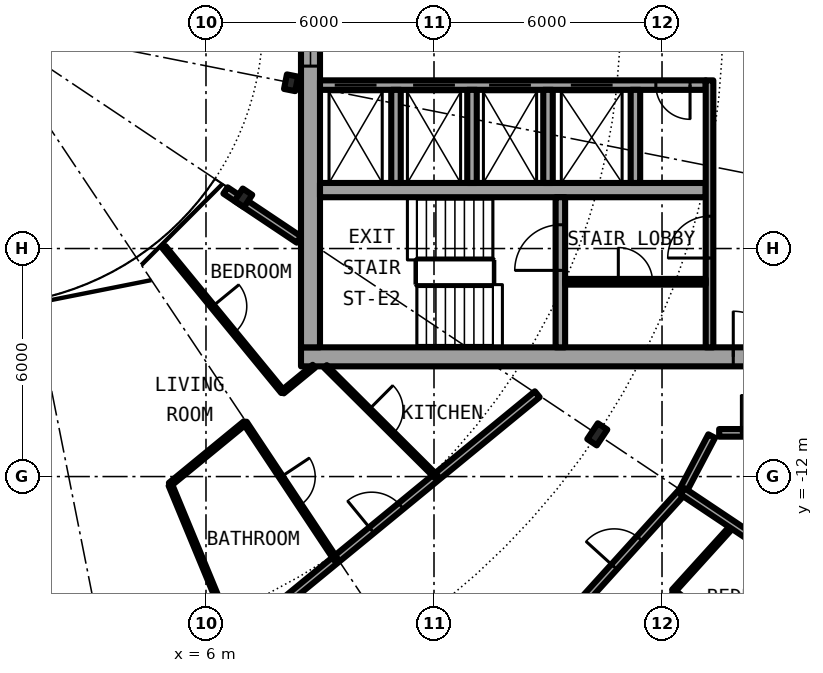
"""IFC4 building model, lengths in metres.
Left out: names, types, materials, properties, quantities, classifications, styles, units other than length and angle.
Written with IfcOpenShell. Run it as: python <this file> out.ifc"""

import sys

from ifc_helpers import new_model, si_unit, direction, frame, frame_2d, origin, origin_2d, place, context, subcontext, project, spatial, rectangle, i_section, extrude, element, fill, save


model = new_model("IFC4")
c1 = context("Model", 3, precision=1e-05, world=origin(), true_north=direction((0.0, 1.0)))
c2 = subcontext(c1, "Body", "Model", "MODEL_VIEW")
j1 = project(units=[si_unit("LENGTHUNIT", "METRE"), si_unit("PLANEANGLEUNIT", "RADIAN")], contexts=[c1])
p1 = place(None, origin())
s1 = spatial("IfcSite", under=j1, at=p1, CompositionType="ELEMENT")
p2 = place(p1, origin())
s2 = spatial("IfcBuilding", under=s1, at=p2, CompositionType="ELEMENT")
p3 = place(p2, frame((0.0, 0.0, 145.2)))
s3 = spatial("IfcBuildingStorey", under=s2, at=p3, CompositionType="ELEMENT", Elevation=145.2)
p4 = place(p3, frame((16.297, -10.889, 0.0), z_axis=(0.0, 0.0, 1.0), x_axis=(0.831469612303, -0.55557023302, 0.0)))
e1 = element("IfcColumn", 1, at=p4, inside=s3, PredefinedType="COLUMN", context=c2, shape_type="SweptSolid", body=[
    extrude(i_section(OverallWidth=0.3, OverallDepth=0.5, WebThickness=0.014, FlangeThickness=0.028, FilletRadius=0.027, at=origin_2d()), origin(), (0.0, 0.0, 1.0), 3.05),
])
for number, where, z_axis, x_axis in (
    (2, (6.984, -4.667, 0.0), (0.0, 0.0, 1.0), (0.831, -0.556, 0.0)),
    (3, (8.239, -1.639, 0.0), (0.0, 0.0, 1.0), (0.981, -0.195, 0.0)),
):
    element("IfcColumn", number, at=place(p3, frame(where, z_axis=z_axis, x_axis=x_axis)), inside=s3, PredefinedType="COLUMN", context=c2, shape_type="SweptSolid", body=[
        extrude(i_section(OverallWidth=0.3, OverallDepth=0.39, WebThickness=0.011, FlangeThickness=0.019, FilletRadius=0.027, at=origin_2d()), origin(), (0.0, 0.0, 1.0), 3.05),
    ])
p5 = place(p3, frame((8.5, -8.85, 0.0), z_axis=(0.0, 0.0, 1.0), x_axis=(1.0, 0.0, 0.0)))
e4 = element("IfcWall", 4, at=p5, inside=s3, PredefinedType="SHEAR", context=c2, shape_type="SweptSolid", body=[
    extrude(rectangle(XDim=13.6, YDim=0.5, at=frame_2d((6.8, 0.0))), origin(), (0.0, 0.0, 1.0), 3.05),
])
p6 = place(p5, frame((11.375, 0.0, 0.0)))
e5 = element("IfcOpeningElement", 5, at=p6, cuts=e4, PredefinedType="OPENING", context=c2, shape_type="SweptSolid", body=[
    extrude(rectangle(XDim=1.2, YDim=2.3, at=frame_2d((0.6, 1.15))), frame((0.0, 0.26, 0.0), z_axis=(0.0, -1.0, 0.0), x_axis=(1.0, 0.0, 0.0)), (0.0, 0.0, 1.0), 0.52),
])
p7 = place(p3, frame((8.75, -8.6, 0.0), z_axis=(0.0, 0.0, 1.0), x_axis=(0.0, 1.0, 0.0)))
e6 = element("IfcWall", 6, at=p7, inside=s3, PredefinedType="SHEAR", context=c2, shape_type="SweptSolid", body=[
    extrude(rectangle(XDim=17.2, YDim=0.5, at=frame_2d((8.6, 0.0))), origin(), (0.0, 0.0, 1.0), 3.05),
])
p8 = place(p7, frame((7.4, 0.0, 0.1)))
e7 = element("IfcOpeningElement", 7, at=p8, cuts=e6, PredefinedType="OPENING", context=c2, shape_type="SweptSolid", body=[
    extrude(rectangle(XDim=2.4, YDim=2.2, at=frame_2d((1.2, 1.1))), frame((0.0, 0.26, 0.0), z_axis=(0.0, -1.0, 0.0), x_axis=(1.0, 0.0, 0.0)), (0.0, 0.0, 1.0), 0.52),
])
p9 = place(p3, frame((19.15, -1.7, 0.0), z_axis=(0.0, 0.0, 1.0), x_axis=(-1.0, 0.0, 0.0)))
e8 = element("IfcWall", 8, at=p9, inside=s3, PredefinedType="SHEAR", context=c2, shape_type="SweptSolid", body=[
    extrude(rectangle(XDim=10.15, YDim=0.25, at=frame_2d((5.075, 0.0))), origin(), (0.0, 0.0, 1.0), 3.05),
])
p10 = place(p9, frame((8.663, 0.0, 0.0)))
e9 = element("IfcOpeningElement", 9, at=p10, cuts=e8, PredefinedType="OPENING", context=c2, shape_type="SweptSolid", body=[
    extrude(rectangle(XDim=1.1, YDim=2.3, at=frame_2d((0.55, 1.15))), frame((0.0, 0.135, 0.0), z_axis=(0.0, -1.0, 0.0), x_axis=(1.0, 0.0, 0.0)), (0.0, 0.0, 1.0), 0.27),
])
p11 = place(p9, frame((6.6, 0.0, 0.0)))
e10 = element("IfcOpeningElement", 10, at=p11, cuts=e8, PredefinedType="OPENING", context=c2, shape_type="SweptSolid", body=[
    extrude(rectangle(XDim=1.1, YDim=2.3, at=frame_2d((0.55, 1.15))), frame((0.0, 0.135, 0.0), z_axis=(0.0, -1.0, 0.0), x_axis=(1.0, 0.0, 0.0)), (0.0, 0.0, 1.0), 0.27),
])
p12 = place(p9, frame((4.6, 0.0, 0.0)))
e11 = element("IfcOpeningElement", 11, at=p12, cuts=e8, PredefinedType="OPENING", context=c2, shape_type="SweptSolid", body=[
    extrude(rectangle(XDim=1.1, YDim=2.3, at=frame_2d((0.55, 1.15))), frame((0.0, 0.135, 0.0), z_axis=(0.0, -1.0, 0.0), x_axis=(1.0, 0.0, 0.0)), (0.0, 0.0, 1.0), 0.27),
])
p13 = place(p9, frame((2.45, 0.0, 0.0)))
e12 = element("IfcOpeningElement", 12, at=p13, cuts=e8, PredefinedType="OPENING", context=c2, shape_type="SweptSolid", body=[
    extrude(rectangle(XDim=1.1, YDim=2.3, at=frame_2d((0.55, 1.15))), frame((0.0, 0.135, 0.0), z_axis=(0.0, -1.0, 0.0), x_axis=(1.0, 0.0, 0.0)), (0.0, 0.0, 1.0), 0.27),
])
p14 = place(p9, frame((0.413, 0.0, 0.0)))
e13 = element("IfcOpeningElement", 13, at=p14, cuts=e8, PredefinedType="OPENING", context=c2, shape_type="SweptSolid", body=[
    extrude(rectangle(XDim=0.9, YDim=2.3, at=frame_2d((0.45, 1.15))), frame((0.0, 0.135, 0.0), z_axis=(0.0, -1.0, 0.0), x_axis=(1.0, 0.0, 0.0)), (0.0, 0.0, 1.0), 0.27),
])
p15 = place(p3, frame((9.0, -4.462, 0.0), z_axis=(0.0, 0.0, 1.0), x_axis=(1.0, 0.0, 0.0)))
e14 = element("IfcWall", 14, at=p15, inside=s3, PredefinedType="SHEAR", context=c2, shape_type="SweptSolid", body=[
    extrude(rectangle(XDim=10.15, YDim=0.375, at=frame_2d((5.075, 0.0))), origin(), (0.0, 0.0, 1.0), 3.05),
])
p16 = place(p3, frame((15.325, -8.6, 0.0), z_axis=(0.0, 0.0, 1.0), x_axis=(0.0, 1.0, 0.0)))
e15 = element("IfcWall", 15, at=p16, inside=s3, PredefinedType="SHEAR", context=c2, shape_type="SweptSolid", body=[
    extrude(rectangle(XDim=3.95, YDim=0.25, at=frame_2d((1.975, 0.0))), origin(), (0.0, 0.0, 1.0), 3.05),
])
p17 = place(p16, frame((2.025, 0.0, 0.0)))
e16 = element("IfcOpeningElement", 16, at=p17, cuts=e15, PredefinedType="OPENING", context=c2, shape_type="SweptSolid", body=[
    extrude(rectangle(XDim=1.2, YDim=2.3, at=frame_2d((0.6, 1.15))), frame((0.0, 0.135, 0.0), z_axis=(0.0, -1.0, 0.0), x_axis=(1.0, 0.0, 0.0)), (0.0, 0.0, 1.0), 0.27),
])
for number, where, z_axis, x_axis in (
    (17, (15.0, -1.825, 0.0), (0.0, 0.0, 1.0), (0.0, -1.0, 0.0)),
    (18, (17.3, -1.825, 0.0), (0.0, 0.0, 1.0), (0.0, -1.0, 0.0)),
):
    element("IfcWall", number, at=place(p3, frame(where, z_axis=z_axis, x_axis=x_axis)), inside=s3, PredefinedType="SOLIDWALL", context=c2, shape_type="SweptSolid", body=[
        extrude(rectangle(XDim=2.45, YDim=0.25, at=frame_2d((1.225, 0.0))), origin(), (0.0, 0.0, 1.0), 2.7),
    ])
p18 = place(p3, frame((19.25, -8.6, 0.0), z_axis=(0.0, 0.0, 1.0), x_axis=(0.0, 1.0, 0.0)))
e19 = element("IfcWall", 19, at=p18, inside=s3, PredefinedType="SOLIDWALL", context=c2, shape_type="SweptSolid", body=[
    extrude(rectangle(XDim=7.025, YDim=0.2, at=frame_2d((3.513, 0.0))), origin(), (0.0, 0.0, 1.0), 2.7),
])
p19 = place(p18, frame((2.35, 0.0, 0.0)))
e20 = element("IfcOpeningElement", 20, at=p19, cuts=e19, PredefinedType="OPENING", context=c2, shape_type="SweptSolid", body=[
    extrude(rectangle(XDim=1.1, YDim=2.3, at=frame_2d((0.55, 1.15))), frame((0.0, 0.11, 0.0), z_axis=(0.0, -1.0, 0.0), x_axis=(1.0, 0.0, 0.0)), (0.0, 0.0, 1.0), 0.22),
])
for number, where, z_axis, x_axis in (
    (21, (11.0, -1.825, 0.0), (0.0, 0.0, 1.0), (0.0, -1.0, 0.0)),
    (22, (13.0, -1.825, 0.0), (0.0, 0.0, 1.0), (0.0, -1.0, 0.0)),
):
    element("IfcWall", number, at=place(p3, frame(where, z_axis=z_axis, x_axis=x_axis)), inside=s3, PredefinedType="SOLIDWALL", context=c2, shape_type="SweptSolid", body=[
        extrude(rectangle(XDim=2.45, YDim=0.25, at=frame_2d((1.225, 0.0))), origin(), (0.0, 0.0, 1.0), 2.7),
    ])
p20 = place(p3, frame((15.45, -6.875, 0.0), z_axis=(0.0, 0.0, 1.0), x_axis=(1.0, 0.0, 0.0)))
e23 = element("IfcWall", 23, at=p20, inside=s3, PredefinedType="PARTITIONING", context=c2, shape_type="SweptSolid", body=[
    extrude(rectangle(XDim=3.7, YDim=0.15, at=frame_2d((1.85, 0.0))), origin(), (0.0, 0.0, 1.0), 2.7),
])
p21 = place(p20, frame((1.4, 0.0, 0.0)))
e24 = element("IfcOpeningElement", 24, at=p21, cuts=e23, PredefinedType="OPENING", context=c2, shape_type="SweptSolid", body=[
    extrude(rectangle(XDim=0.9, YDim=2.3, at=frame_2d((0.45, 1.15))), frame((0.0, 0.085, 0.0), z_axis=(0.0, -1.0, 0.0), x_axis=(1.0, 0.0, 0.0)), (0.0, 0.0, 1.0), 0.17),
])
p22 = place(p3, frame((18.302, -15.01, 0.0), z_axis=(0.0, 0.0, 1.0), x_axis=(0.671637685376, 0.740879760544, 0.0)))
e25 = element("IfcWall", 25, at=p22, inside=s3, PredefinedType="PARTITIONING", context=c2, shape_type="SweptSolid", body=[
    extrude(rectangle(XDim=2.338, YDim=0.1, at=frame_2d((1.169, 0.0))), origin(), (0.0, 0.0, 1.0), 2.7),
])
p23 = place(p3, frame((18.542, -12.389, 0.0), z_axis=(0.0, 0.0, 1.0), x_axis=(0.465605550524, 0.884992356646, 0.0)))
e26 = element("IfcWall", 26, at=p23, inside=s3, PredefinedType="PARTITIONING", context=c2, shape_type="SweptSolid", body=[
    extrude(rectangle(XDim=1.643, YDim=0.2, at=frame_2d((0.821, 0.0))), origin(), (0.0, 0.0, 1.0), 2.7),
])
p24 = place(p3, frame((14.147, -17.238, 0.0), z_axis=(0.0, 0.0, 1.0), x_axis=(0.671561669125, 0.740948665268, 0.0)))
e27 = element("IfcWall", 27, at=p24, inside=s3, PredefinedType="PARTITIONING", context=c2, shape_type="SweptSolid", body=[
    extrude(rectangle(XDim=6.544, YDim=0.2, at=frame_2d((3.272, 0.0))), origin(), (0.0, 0.0, 1.0), 2.7),
])
p25 = place(p24, frame((3.862, 0.0, 0.0)))
e28 = element("IfcOpeningElement", 28, at=p25, cuts=e27, PredefinedType="OPENING", context=c2, shape_type="SweptSolid", body=[
    extrude(rectangle(XDim=1.0, YDim=2.3, at=frame_2d((0.5, 1.15))), frame((0.0, 0.11, 0.0), z_axis=(0.0, -1.0, 0.0), x_axis=(1.0, 0.0, 0.0)), (0.0, 0.0, 1.0), 0.22),
])
p26 = place(p3, frame((6.773, -16.353, 0.0), z_axis=(0.0, 0.0, 1.0), x_axis=(0.773034536097, 0.634363938131, 0.0)))
e29 = element("IfcWall", 29, at=p26, inside=s3, PredefinedType="PARTITIONING", context=c2, shape_type="SweptSolid", body=[
    extrude(rectangle(XDim=10.277, YDim=0.2, at=frame_2d((5.138, 0.0))), origin(), (0.0, 0.0, 1.0), 2.7),
])
p27 = place(p26, frame((4.638, 0.0, 0.0)))
e30 = element("IfcOpeningElement", 30, at=p27, cuts=e29, PredefinedType="OPENING", context=c2, shape_type="SweptSolid", body=[
    extrude(rectangle(XDim=1.0, YDim=2.3, at=frame_2d((0.5, 1.15))), frame((0.0, 0.11, 0.0), z_axis=(0.0, -1.0, 0.0), x_axis=(1.0, 0.0, 0.0)), (0.0, 0.0, 1.0), 0.22),
])
p28 = place(p3, frame((5.055, -12.204, 0.0), z_axis=(0.0, 0.0, 1.0), x_axis=(0.772943675046, 0.634474645046, 0.0)))
e31 = element("IfcWall", 31, at=p28, inside=s3, PredefinedType="PARTITIONING", context=c2, shape_type="SweptSolid", body=[
    extrude(rectangle(XDim=2.557, YDim=0.1, at=frame_2d((1.278, 0.0))), origin(), (0.0, 0.0, 1.0), 2.7),
])
p29 = place(p3, frame((8.016, -9.773, 0.0), z_axis=(0.0, 0.0, 1.0), x_axis=(0.7731800648, 0.634186555673, 0.0)))
e32 = element("IfcWall", 32, at=p29, inside=s3, PredefinedType="PARTITIONING", context=c2, shape_type="SweptSolid", body=[
    extrude(rectangle(XDim=1.064, YDim=0.1, at=frame_2d((0.532, 0.0))), origin(), (0.0, 0.0, 1.0), 2.7),
])
p30 = place(p3, frame((19.504, -10.85, 0.0), z_axis=(0.0, 0.0, 1.0), x_axis=(1.0, 0.0, 0.0)))
e33 = element("IfcWall", 33, at=p30, inside=s3, PredefinedType="PARTITIONING", context=c2, shape_type="SweptSolid", body=[
    extrude(rectangle(XDim=2.171, YDim=0.2, at=frame_2d((1.085, 0.0))), origin(), (0.0, 0.0, 1.0), 2.7),
])
p31 = place(p30, frame((0.585, 0.0, 0.0)))
e34 = element("IfcOpeningElement", 34, at=p31, cuts=e33, PredefinedType="OPENING", context=c2, shape_type="SweptSolid", body=[
    extrude(rectangle(XDim=1.0, YDim=2.3, at=frame_2d((0.5, 1.15))), frame((0.0, 0.11, 0.0), z_axis=(0.0, -1.0, 0.0), x_axis=(1.0, 0.0, 0.0)), (0.0, 0.0, 1.0), 0.22),
])
p32 = place(p3, frame((6.513, -4.472, 0.0), z_axis=(0.0, 0.0, 1.0), x_axis=(0.83133816625, -0.555766905579, 0.0)))
e35 = element("IfcWall", 35, at=p32, inside=s3, PredefinedType="PARTITIONING", context=c2, shape_type="SweptSolid", body=[
    extrude(rectangle(XDim=2.323, YDim=0.2, at=frame_2d((1.162, 0.0))), origin(), (0.0, 0.0, 1.0), 2.7),
])
p33 = place(p3, frame((4.898, -5.968, 0.0), z_axis=(0.0, 0.0, 1.0), x_axis=(0.634401778971, -0.773003481776, 0.0)))
e36 = element("IfcWall", 36, at=p33, inside=s3, PredefinedType="PARTITIONING", context=c2, shape_type="SweptSolid", body=[
    extrude(rectangle(XDim=4.92, YDim=0.1, at=frame_2d((2.46, 0.0))), origin(), (0.0, 0.0, 1.0), 2.7),
])
p34 = place(p33, frame((2.01, 0.0, 0.0)))
e37 = element("IfcOpeningElement", 37, at=p34, cuts=e36, PredefinedType="OPENING", context=c2, shape_type="SweptSolid", body=[
    extrude(rectangle(XDim=0.9, YDim=2.3, at=frame_2d((0.45, 1.15))), frame((0.0, 0.06, 0.0), z_axis=(0.0, -1.0, 0.0), x_axis=(1.0, 0.0, 0.0)), (0.0, 0.0, 1.0), 0.12),
])
p35 = place(p3, frame((7.028, -10.584, 0.0), z_axis=(0.0, 0.0, 1.0), x_axis=(0.553303732327, -0.832979579457, 0.0)))
e38 = element("IfcWall", 38, at=p35, inside=s3, PredefinedType="PARTITIONING", context=c2, shape_type="SweptSolid", body=[
    extrude(rectangle(XDim=4.319, YDim=0.1, at=frame_2d((2.16, 0.0))), origin(), (0.0, 0.0, 1.0), 2.7),
])
p36 = place(p35, frame((1.71, 0.0, 0.0)))
e39 = element("IfcOpeningElement", 39, at=p36, cuts=e38, PredefinedType="OPENING", context=c2, shape_type="SweptSolid", body=[
    extrude(rectangle(XDim=0.9, YDim=2.3, at=frame_2d((0.45, 1.15))), frame((0.0, 0.06, 0.0), z_axis=(0.0, -1.0, 0.0), x_axis=(1.0, 0.0, 0.0)), (0.0, 0.0, 1.0), 0.12),
])
p37 = place(p3, frame((9.144, -9.104, 0.0), z_axis=(0.0, 0.0, 1.0), x_axis=(0.708793214553, -0.705416316088, 0.0)))
e40 = element("IfcWall", 40, at=p37, inside=s3, PredefinedType="PARTITIONING", context=c2, shape_type="SweptSolid", body=[
    extrude(rectangle(XDim=4.121, YDim=0.1, at=frame_2d((2.061, 0.0))), origin(), (0.0, 0.0, 1.0), 2.7),
])
p38 = place(p37, frame((1.611, 0.0, 0.0)))
e41 = element("IfcOpeningElement", 41, at=p38, cuts=e40, PredefinedType="OPENING", context=c2, shape_type="SweptSolid", body=[
    extrude(rectangle(XDim=0.9, YDim=2.3, at=frame_2d((0.45, 1.15))), frame((0.0, 0.06, 0.0), z_axis=(0.0, -1.0, 0.0), x_axis=(1.0, 0.0, 0.0)), (0.0, 0.0, 1.0), 0.12),
])
p39 = place(p3, frame((18.299, -15.014, 0.0), z_axis=(0.0, 0.0, 1.0), x_axis=(0.773131168403, -0.634246163917, 0.0)))
e42 = element("IfcWall", 42, at=p39, inside=s3, PredefinedType="PARTITIONING", context=c2, shape_type="SweptSolid", body=[
    extrude(rectangle(XDim=3.505, YDim=0.1, at=frame_2d((1.752, 0.0))), origin(), (0.0, 0.0, 1.0), 2.7),
])
p40 = place(p39, frame((1.302, 0.0, 0.0)))
e43 = element("IfcOpeningElement", 43, at=p40, cuts=e42, PredefinedType="OPENING", context=c2, shape_type="SweptSolid", body=[
    extrude(rectangle(XDim=0.9, YDim=2.3, at=frame_2d((0.45, 1.15))), frame((0.0, 0.06, 0.0), z_axis=(0.0, -1.0, 0.0), x_axis=(1.0, 0.0, 0.0)), (0.0, 0.0, 1.0), 0.12),
])
p41 = place(p3, frame((18.542, -12.389, 0.0), z_axis=(0.0, 0.0, 1.0), x_axis=(0.831387096605, -0.55569370664, 0.0)))
e44 = element("IfcWall", 44, at=p41, inside=s3, PredefinedType="PARTITIONING", context=c2, shape_type="SweptSolid", body=[
    extrude(rectangle(XDim=4.875, YDim=0.2, at=frame_2d((2.438, 0.0))), origin(), (0.0, 0.0, 1.0), 2.7),
])
p42 = place(p3, frame((6.765, -16.334, 0.0), z_axis=(0.0, 0.0, 1.0), x_axis=(-0.382498794932, 0.923955990226, 0.0)))
e45 = element("IfcWall", 45, at=p42, inside=s3, PredefinedType="PARTITIONING", context=c2, shape_type="SweptSolid", body=[
    extrude(rectangle(XDim=4.449, YDim=0.1, at=frame_2d((2.225, 0.0))), origin(), (0.0, 0.0, 1.0), 2.7),
])
p43 = place(p10, origin())
e46 = element("IfcDoor", 46, at=p43, inside=s3, OperationType="DOUBLE_DOOR_SLIDING", PredefinedType="DOOR", context=c2, shape_type="SweptSolid", body=[
    extrude(rectangle(XDim=1.1, YDim=2.3, at=frame_2d((0.55, 1.15))), frame((0.0, 0.025, 0.0), z_axis=(0.0, -1.0, 0.0), x_axis=(1.0, 0.0, 0.0)), (0.0, 0.0, 1.0), 0.05),
])
fill(e9, e46)
p44 = place(p11, origin())
e47 = element("IfcDoor", 47, at=p44, inside=s3, OperationType="DOUBLE_DOOR_SLIDING", PredefinedType="DOOR", context=c2, shape_type="SweptSolid", body=[
    extrude(rectangle(XDim=1.1, YDim=2.3, at=frame_2d((0.55, 1.15))), frame((0.0, 0.025, 0.0), z_axis=(0.0, -1.0, 0.0), x_axis=(1.0, 0.0, 0.0)), (0.0, 0.0, 1.0), 0.05),
])
fill(e10, e47)
p45 = place(p12, origin())
e48 = element("IfcDoor", 48, at=p45, inside=s3, OperationType="DOUBLE_DOOR_SLIDING", PredefinedType="DOOR", context=c2, shape_type="SweptSolid", body=[
    extrude(rectangle(XDim=1.1, YDim=2.3, at=frame_2d((0.55, 1.15))), frame((0.0, 0.025, 0.0), z_axis=(0.0, -1.0, 0.0), x_axis=(1.0, 0.0, 0.0)), (0.0, 0.0, 1.0), 0.05),
])
fill(e11, e48)
p46 = place(p13, origin())
e49 = element("IfcDoor", 49, at=p46, inside=s3, OperationType="DOUBLE_DOOR_SLIDING", PredefinedType="DOOR", context=c2, shape_type="SweptSolid", body=[
    extrude(rectangle(XDim=1.1, YDim=2.3, at=frame_2d((0.55, 1.15))), frame((0.0, 0.025, 0.0), z_axis=(0.0, -1.0, 0.0), x_axis=(1.0, 0.0, 0.0)), (0.0, 0.0, 1.0), 0.05),
])
fill(e12, e49)
p47 = place(p14, origin())
e50 = element("IfcDoor", 50, at=p47, inside=s3, OperationType="SINGLE_SWING_RIGHT", PredefinedType="DOOR", context=c2, shape_type="SweptSolid", body=[
    extrude(rectangle(XDim=0.9, YDim=2.3, at=frame_2d((0.45, 1.15))), frame((0.0, 0.025, 0.0), z_axis=(0.0, -1.0, 0.0), x_axis=(1.0, 0.0, 0.0)), (0.0, 0.0, 1.0), 0.05),
])
fill(e13, e50)
p48 = place(p21, origin())
e51 = element("IfcDoor", 51, at=p48, inside=s3, OperationType="SINGLE_SWING_LEFT", PredefinedType="DOOR", context=c2, shape_type="SweptSolid", body=[
    extrude(rectangle(XDim=0.9, YDim=2.3, at=frame_2d((0.45, 1.15))), frame((0.0, 0.025, 0.0), z_axis=(0.0, -1.0, 0.0), x_axis=(1.0, 0.0, 0.0)), (0.0, 0.0, 1.0), 0.05),
])
fill(e24, e51)
p49 = place(p17, origin())
e52 = element("IfcDoor", 52, at=p49, inside=s3, OperationType="SINGLE_SWING_LEFT", PredefinedType="DOOR", context=c2, shape_type="SweptSolid", body=[
    extrude(rectangle(XDim=1.2, YDim=2.3, at=frame_2d((0.6, 1.15))), frame((0.0, 0.025, 0.0), z_axis=(0.0, -1.0, 0.0), x_axis=(1.0, 0.0, 0.0)), (0.0, 0.0, 1.0), 0.05),
])
fill(e16, e52)
p50 = place(p19, origin())
e53 = element("IfcDoor", 53, at=p50, inside=s3, OperationType="SINGLE_SWING_RIGHT", PredefinedType="DOOR", context=c2, shape_type="SweptSolid", body=[
    extrude(rectangle(XDim=1.1, YDim=2.3, at=frame_2d((0.55, 1.15))), frame((0.0, 0.025, 0.0), z_axis=(0.0, -1.0, 0.0), x_axis=(1.0, 0.0, 0.0)), (0.0, 0.0, 1.0), 0.05),
])
fill(e20, e53)
p51 = place(p6, origin())
e54 = element("IfcDoor", 54, at=p51, inside=s3, OperationType="SINGLE_SWING_LEFT", PredefinedType="DOOR", context=c2, shape_type="SweptSolid", body=[
    extrude(rectangle(XDim=1.2, YDim=2.3, at=frame_2d((0.6, 1.15))), frame((0.0, 0.025, 0.0), z_axis=(0.0, -1.0, 0.0), x_axis=(1.0, 0.0, 0.0)), (0.0, 0.0, 1.0), 0.05),
])
fill(e5, e54)
p52 = place(p8, origin())
e55 = element("IfcWindow", 55, at=p52, inside=s3, PartitioningType="SINGLE_PANEL", PredefinedType="WINDOW", context=c2, shape_type="SweptSolid", body=[
    extrude(rectangle(XDim=2.4, YDim=2.2, at=frame_2d((1.2, 1.1))), frame((0.0, 0.03, 0.0), z_axis=(0.0, -1.0, 0.0), x_axis=(1.0, 0.0, 0.0)), (0.0, 0.0, 1.0), 0.06),
])
fill(e7, e55)
p53 = place(p25, origin())
e56 = element("IfcDoor", 56, at=p53, inside=s3, OperationType="SINGLE_SWING_RIGHT", PredefinedType="DOOR", context=c2, shape_type="SweptSolid", body=[
    extrude(rectangle(XDim=1.0, YDim=2.3, at=frame_2d((0.5, 1.15))), frame((0.0, 0.025, 0.0), z_axis=(0.0, -1.0, 0.0), x_axis=(1.0, 0.0, 0.0)), (0.0, 0.0, 1.0), 0.05),
])
fill(e28, e56)
p54 = place(p27, origin())
e57 = element("IfcDoor", 57, at=p54, inside=s3, OperationType="SINGLE_SWING_RIGHT", PredefinedType="DOOR", context=c2, shape_type="SweptSolid", body=[
    extrude(rectangle(XDim=1.0, YDim=2.3, at=frame_2d((0.5, 1.15))), frame((0.0, 0.025, 0.0), z_axis=(0.0, -1.0, 0.0), x_axis=(1.0, 0.0, 0.0)), (0.0, 0.0, 1.0), 0.05),
])
fill(e30, e57)
p55 = place(p36, origin())
e58 = element("IfcDoor", 58, at=p55, inside=s3, OperationType="SINGLE_SWING_LEFT", PredefinedType="DOOR", context=c2, shape_type="SweptSolid", body=[
    extrude(rectangle(XDim=0.9, YDim=2.3, at=frame_2d((0.45, 1.15))), frame((0.0, 0.025, 0.0), z_axis=(0.0, -1.0, 0.0), x_axis=(1.0, 0.0, 0.0)), (0.0, 0.0, 1.0), 0.05),
])
fill(e39, e58)
p56 = place(p38, origin())
e59 = element("IfcDoor", 59, at=p56, inside=s3, OperationType="SINGLE_SWING_RIGHT", PredefinedType="DOOR", context=c2, shape_type="SweptSolid", body=[
    extrude(rectangle(XDim=0.9, YDim=2.3, at=frame_2d((0.45, 1.15))), frame((0.0, 0.025, 0.0), z_axis=(0.0, -1.0, 0.0), x_axis=(1.0, 0.0, 0.0)), (0.0, 0.0, 1.0), 0.05),
])
fill(e41, e59)
p57 = place(p34, origin())
e60 = element("IfcDoor", 60, at=p57, inside=s3, OperationType="SINGLE_SWING_RIGHT", PredefinedType="DOOR", context=c2, shape_type="SweptSolid", body=[
    extrude(rectangle(XDim=0.9, YDim=2.3, at=frame_2d((0.45, 1.15))), frame((0.0, 0.025, 0.0), z_axis=(0.0, -1.0, 0.0), x_axis=(1.0, 0.0, 0.0)), (0.0, 0.0, 1.0), 0.05),
])
fill(e37, e60)
p58 = place(p31, origin())
e61 = element("IfcDoor", 61, at=p58, inside=s3, OperationType="SINGLE_SWING_LEFT", PredefinedType="DOOR", context=c2, shape_type="SweptSolid", body=[
    extrude(rectangle(XDim=1.0, YDim=2.3, at=frame_2d((0.5, 1.15))), frame((0.0, 0.025, 0.0), z_axis=(0.0, -1.0, 0.0), x_axis=(1.0, 0.0, 0.0)), (0.0, 0.0, 1.0), 0.05),
])
fill(e34, e61)
save(model, sys.argv[1])
